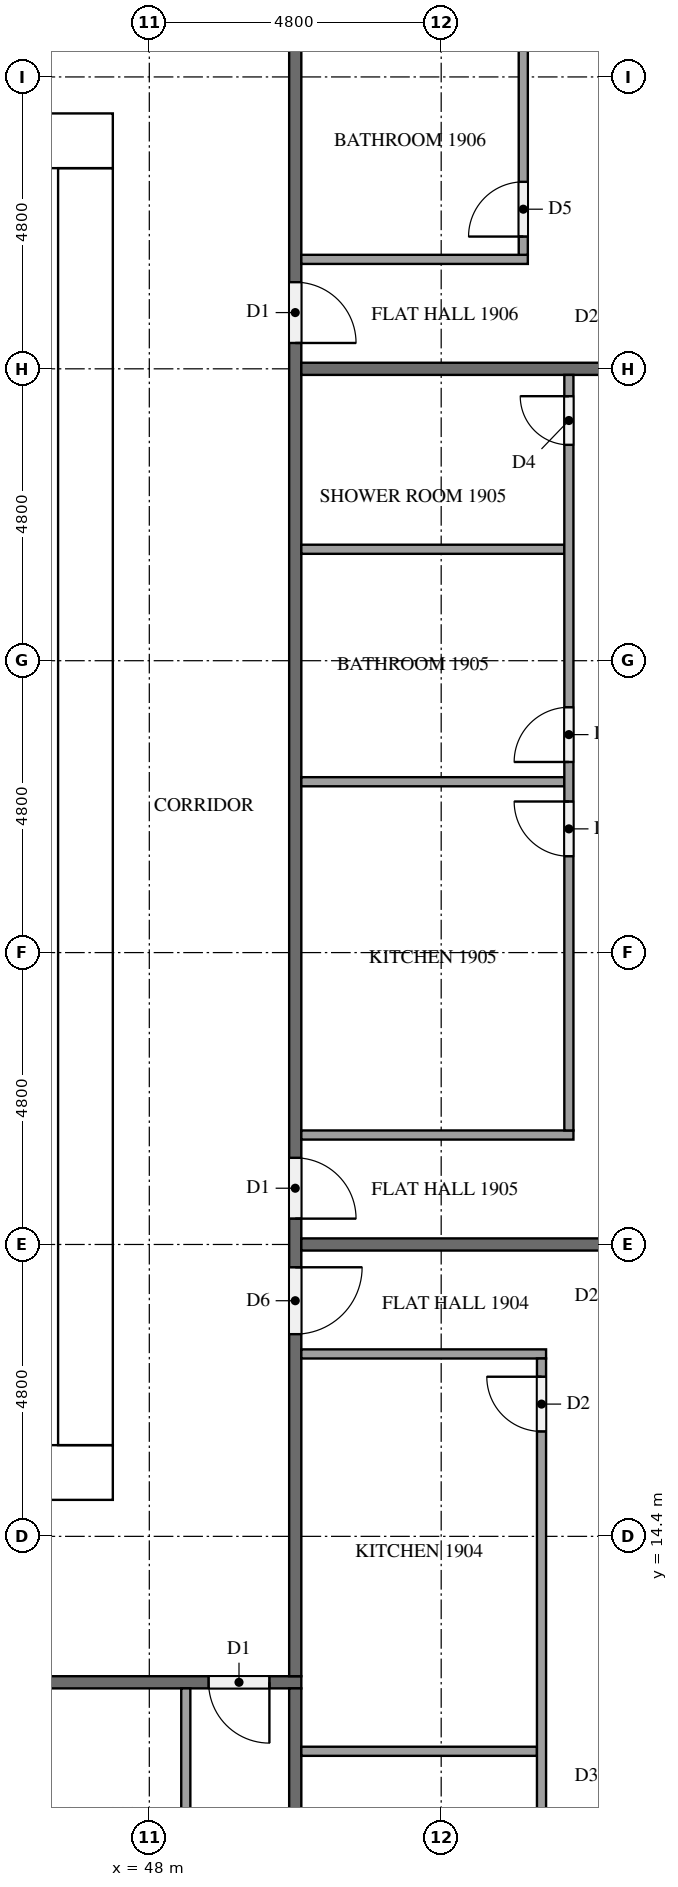
"""IFC4 building model, lengths in metres.
Left out: names, types, materials, properties, quantities, classifications, styles, units other than length and angle.
Written with IfcOpenShell. Run it as: python <this file> out.ifc"""

import sys

from ifc_helpers import new_model, si_unit, direction, frame, frame_2d, origin, place, context, subcontext, project, spatial, rectangle, extrude, element, fill, save


model = new_model("IFC4")
c1 = context("Model", 3, precision=1e-05, world=origin(), true_north=direction((0.0, 1.0)))
c2 = subcontext(c1, "Body", "Model", "MODEL_VIEW")
j1 = project(units=[si_unit("LENGTHUNIT", "METRE"), si_unit("PLANEANGLEUNIT", "RADIAN")], contexts=[c1])
p1 = place(None, origin())
s1 = spatial("IfcSite", under=j1, at=p1, CompositionType="ELEMENT")
p2 = place(p1, origin())
s2 = spatial("IfcBuilding", under=s1, at=p2, CompositionType="ELEMENT")
p3 = place(p2, frame((0.0, 0.0, 76.8)))
s3 = spatial("IfcBuildingStorey", under=s2, at=p3, CompositionType="ELEMENT", Elevation=76.8)
p4 = place(p3, frame((15.0, 15.45, 0.0), z_axis=(0.0, 0.0, 1.0), x_axis=(1.0, 0.0, 0.0)))
e1 = element("IfcWall", 1, at=p4, inside=s3, PredefinedType="SHEAR", context=c2, shape_type="SweptSolid", body=[
    extrude(rectangle(XDim=32.4, YDim=0.9, at=frame_2d((16.2, 0.0))), origin(), (0.0, 0.0, 1.0), 3.2),
])
p5 = place(p4, frame((15.3, 0.0, 0.0)))
e2 = element("IfcOpeningElement", 2, at=p5, cuts=e1, PredefinedType="OPENING", context=c2, shape_type="SweptSolid", body=[
    extrude(rectangle(XDim=1.8, YDim=2.1, at=frame_2d((0.9, 1.05))), frame((0.0, 0.46, 0.0), z_axis=(0.0, -1.0, 0.0), x_axis=(1.0, 0.0, 0.0)), (0.0, 0.0, 1.0), 0.92),
])
p6 = place(p3, frame((15.0, 37.35, 0.0), z_axis=(0.0, 0.0, 1.0), x_axis=(1.0, 0.0, 0.0)))
e3 = element("IfcWall", 3, at=p6, inside=s3, PredefinedType="SHEAR", context=c2, shape_type="SweptSolid", body=[
    extrude(rectangle(XDim=32.4, YDim=0.9, at=frame_2d((16.2, 0.0))), origin(), (0.0, 0.0, 1.0), 3.2),
])
p7 = place(p6, frame((15.3, 0.0, 0.0)))
e4 = element("IfcOpeningElement", 4, at=p7, cuts=e3, PredefinedType="OPENING", context=c2, shape_type="SweptSolid", body=[
    extrude(rectangle(XDim=1.8, YDim=2.1, at=frame_2d((0.9, 1.05))), frame((0.0, 0.46, 0.0), z_axis=(0.0, -1.0, 0.0), x_axis=(1.0, 0.0, 0.0)), (0.0, 0.0, 1.0), 0.92),
])
p8 = place(p6, frame((1.794, 0.0, 0.0)))
e5 = element("IfcOpeningElement", 5, at=p8, cuts=e3, PredefinedType="OPENING", context=c2, shape_type="SweptSolid", body=[
    extrude(rectangle(XDim=1.0, YDim=2.1, at=frame_2d((0.5, 1.05))), frame((0.0, 0.46, 0.0), z_axis=(0.0, -1.0, 0.0), x_axis=(1.0, 0.0, 0.0)), (0.0, 0.0, 1.0), 0.92),
])
p9 = place(p6, frame((5.331, 0.0, 0.0)))
e6 = element("IfcOpeningElement", 6, at=p9, cuts=e3, PredefinedType="OPENING", context=c2, shape_type="SweptSolid", body=[
    extrude(rectangle(XDim=1.0, YDim=2.1, at=frame_2d((0.5, 1.05))), frame((0.0, 0.46, 0.0), z_axis=(0.0, -1.0, 0.0), x_axis=(1.0, 0.0, 0.0)), (0.0, 0.0, 1.0), 0.92),
])
p10 = place(p3, frame((46.95, 15.9, 0.0), z_axis=(0.0, 0.0, 1.0), x_axis=(0.0, 1.0, 0.0)))
e7 = element("IfcWall", 7, at=p10, inside=s3, PredefinedType="SHEAR", context=c2, shape_type="SweptSolid", body=[
    extrude(rectangle(XDim=21.0, YDim=0.9, at=frame_2d((10.5, 0.0))), origin(), (0.0, 0.0, 1.0), 3.2),
])
p11 = place(p10, frame((10.2, 0.0, 0.0)))
e8 = element("IfcOpeningElement", 8, at=p11, cuts=e7, PredefinedType="OPENING", context=c2, shape_type="SweptSolid", body=[
    extrude(rectangle(XDim=1.2, YDim=2.1, at=frame_2d((0.6, 1.05))), frame((0.0, 0.46, 0.0), z_axis=(0.0, -1.0, 0.0), x_axis=(1.0, 0.0, 0.0)), (0.0, 0.0, 1.0), 0.92),
])
p12 = place(p3, frame((50.5, 12.0, 0.0), z_axis=(0.0, 0.0, 1.0), x_axis=(-1.0, 0.0, 0.0)))
e9 = element("IfcWall", 9, at=p12, inside=s3, PredefinedType="PARTITIONING", context=c2, shape_type="SweptSolid", body=[
    extrude(rectangle(XDim=38.6, YDim=0.2, at=frame_2d((19.3, 0.0))), origin(), (0.0, 0.0, 1.0), 3.2),
])
p13 = place(p12, frame((37.075, 0.0, 0.0)))
e10 = element("IfcOpeningElement", 10, at=p13, cuts=e9, PredefinedType="OPENING", context=c2, shape_type="SweptSolid", body=[
    extrude(rectangle(XDim=1.0, YDim=2.1, at=frame_2d((0.5, 1.05))), frame((0.0, 0.11, 0.0), z_axis=(0.0, -1.0, 0.0), x_axis=(1.0, 0.0, 0.0)), (0.0, 0.0, 1.0), 0.22),
])
p14 = place(p12, frame((22.675, 0.0, 0.0)))
e11 = element("IfcOpeningElement", 11, at=p14, cuts=e9, PredefinedType="OPENING", context=c2, shape_type="SweptSolid", body=[
    extrude(rectangle(XDim=1.0, YDim=2.1, at=frame_2d((0.5, 1.05))), frame((0.0, 0.11, 0.0), z_axis=(0.0, -1.0, 0.0), x_axis=(1.0, 0.0, 0.0)), (0.0, 0.0, 1.0), 0.22),
])
p15 = place(p12, frame((0.525, 0.0, 0.0)))
e12 = element("IfcOpeningElement", 12, at=p15, cuts=e9, PredefinedType="OPENING", context=c2, shape_type="SweptSolid", body=[
    extrude(rectangle(XDim=1.0, YDim=2.1, at=frame_2d((0.5, 1.05))), frame((0.0, 0.11, 0.0), z_axis=(0.0, -1.0, 0.0), x_axis=(1.0, 0.0, 0.0)), (0.0, 0.0, 1.0), 0.22),
])
p16 = place(p3, frame((50.4, 40.7, 0.0), z_axis=(0.0, 0.0, 1.0), x_axis=(0.0, -1.0, 0.0)))
e13 = element("IfcWall", 13, at=p16, inside=s3, PredefinedType="PARTITIONING", context=c2, shape_type="SweptSolid", body=[
    extrude(rectangle(XDim=28.6, YDim=0.2, at=frame_2d((14.3, 0.0))), origin(), (0.0, 0.0, 1.0), 3.2),
])
p17 = place(p16, frame((21.875, 0.0, 0.0)))
e14 = element("IfcOpeningElement", 14, at=p17, cuts=e13, PredefinedType="OPENING", context=c2, shape_type="SweptSolid", body=[
    extrude(rectangle(XDim=1.1, YDim=2.1, at=frame_2d((0.55, 1.05))), frame((0.0, 0.11, 0.0), z_axis=(0.0, -1.0, 0.0), x_axis=(1.0, 0.0, 0.0)), (0.0, 0.0, 1.0), 0.22),
])
p18 = place(p16, frame((20.075, 0.0, 0.0)))
e15 = element("IfcOpeningElement", 15, at=p18, cuts=e13, PredefinedType="OPENING", context=c2, shape_type="SweptSolid", body=[
    extrude(rectangle(XDim=1.0, YDim=2.1, at=frame_2d((0.5, 1.05))), frame((0.0, 0.11, 0.0), z_axis=(0.0, -1.0, 0.0), x_axis=(1.0, 0.0, 0.0)), (0.0, 0.0, 1.0), 0.22),
])
p19 = place(p16, frame((5.675, 0.0, 0.0)))
e16 = element("IfcOpeningElement", 16, at=p19, cuts=e13, PredefinedType="OPENING", context=c2, shape_type="SweptSolid", body=[
    extrude(rectangle(XDim=1.0, YDim=2.1, at=frame_2d((0.5, 1.05))), frame((0.0, 0.11, 0.0), z_axis=(0.0, -1.0, 0.0), x_axis=(1.0, 0.0, 0.0)), (0.0, 0.0, 1.0), 0.22),
])
p20 = place(p3, frame((50.4, 11.9, 0.0), z_axis=(0.0, 0.0, 1.0), x_axis=(0.0, -1.0, 0.0)))
e17 = element("IfcWall", 17, at=p20, inside=s3, PredefinedType="PARTITIONING", context=c2, shape_type="SweptSolid", body=[
    extrude(rectangle(XDim=11.8, YDim=0.2, at=frame_2d((5.9, 0.0))), origin(), (0.0, 0.0, 1.0), 3.2),
])
p21 = place(p3, frame((50.5, 19.2, 0.0), z_axis=(0.0, 0.0, 1.0), x_axis=(1.0, 0.0, 0.0)))
e18 = element("IfcWall", 18, at=p21, inside=s3, PredefinedType="PARTITIONING", context=c2, shape_type="SweptSolid", body=[
    extrude(rectangle(XDim=11.8, YDim=0.2, at=frame_2d((5.9, 0.0))), origin(), (0.0, 0.0, 1.0), 3.2),
])
p22 = place(p3, frame((50.5, 33.6, 0.0), z_axis=(0.0, 0.0, 1.0), x_axis=(1.0, 0.0, 0.0)))
e19 = element("IfcWall", 19, at=p22, inside=s3, PredefinedType="PARTITIONING", context=c2, shape_type="SweptSolid", body=[
    extrude(rectangle(XDim=11.475, YDim=0.2, at=frame_2d((5.738, 0.0))), origin(), (0.0, 0.0, 1.0), 3.2),
])
p23 = place(p3, frame((48.6, 11.9, 0.0), z_axis=(0.0, 0.0, 1.0), x_axis=(0.0, -1.0, 0.0)))
e20 = element("IfcWall", 20, at=p23, inside=s3, PredefinedType="PARTITIONING", context=c2, shape_type="SweptSolid", body=[
    extrude(rectangle(XDim=4.325, YDim=0.15, at=frame_2d((2.163, 0.0))), origin(), (0.0, 0.0, 1.0), 3.2),
])
p24 = place(p3, frame((50.5, 10.865, 0.0), z_axis=(0.0, 0.0, 1.0), x_axis=(1.0, 0.0, 0.0)))
e21 = element("IfcWall", 21, at=p24, inside=s3, PredefinedType="PARTITIONING", context=c2, shape_type="SweptSolid", body=[
    extrude(rectangle(XDim=3.875, YDim=0.15, at=frame_2d((1.938, 0.0))), origin(), (0.0, 0.0, 1.0), 3.2),
])
p25 = place(p3, frame((50.5, 17.4, 0.0), z_axis=(0.0, 0.0, 1.0), x_axis=(1.0, 0.0, 0.0)))
e22 = element("IfcWall", 22, at=p25, inside=s3, PredefinedType="PARTITIONING", context=c2, shape_type="SweptSolid", body=[
    extrude(rectangle(XDim=4.025, YDim=0.15, at=frame_2d((2.012, 0.0))), origin(), (0.0, 0.0, 1.0), 3.2),
])
p26 = place(p3, frame((54.45, 0.1, 0.0), z_axis=(0.0, 0.0, 1.0), x_axis=(0.0, 1.0, 0.0)))
e23 = element("IfcWall", 23, at=p26, inside=s3, PredefinedType="PARTITIONING", context=c2, shape_type="SweptSolid", body=[
    extrude(rectangle(XDim=17.225, YDim=0.15, at=frame_2d((8.612, 0.0))), origin(), (0.0, 0.0, 1.0), 3.2),
])
p27 = place(p26, frame((16.025, 0.0, 0.0)))
e24 = element("IfcOpeningElement", 24, at=p27, cuts=e23, PredefinedType="OPENING", context=c2, shape_type="SweptSolid", body=[
    extrude(rectangle(XDim=0.9, YDim=2.1, at=frame_2d((0.45, 1.05))), frame((0.0, 0.085, 0.0), z_axis=(0.0, -1.0, 0.0), x_axis=(1.0, 0.0, 0.0)), (0.0, 0.0, 1.0), 0.17),
])
p28 = place(p26, frame((7.861, 0.0, 0.0)))
e25 = element("IfcOpeningElement", 25, at=p28, cuts=e23, PredefinedType="OPENING", context=c2, shape_type="SweptSolid", body=[
    extrude(rectangle(XDim=0.8, YDim=2.1, at=frame_2d((0.4, 1.05))), frame((0.0, 0.085, 0.0), z_axis=(0.0, -1.0, 0.0), x_axis=(1.0, 0.0, 0.0)), (0.0, 0.0, 1.0), 0.17),
])
p29 = place(p26, frame((6.311, 0.0, 0.0)))
e26 = element("IfcOpeningElement", 26, at=p29, cuts=e23, PredefinedType="OPENING", context=c2, shape_type="SweptSolid", body=[
    extrude(rectangle(XDim=0.9, YDim=2.1, at=frame_2d((0.45, 1.05))), frame((0.0, 0.085, 0.0), z_axis=(0.0, -1.0, 0.0), x_axis=(1.0, 0.0, 0.0)), (0.0, 0.0, 1.0), 0.17),
])
p30 = place(p26, frame((0.35, 0.0, 0.0)))
e27 = element("IfcOpeningElement", 27, at=p30, cuts=e23, PredefinedType="OPENING", context=c2, shape_type="SweptSolid", body=[
    extrude(rectangle(XDim=0.8, YDim=2.1, at=frame_2d((0.4, 1.05))), frame((0.0, 0.085, 0.0), z_axis=(0.0, -1.0, 0.0), x_axis=(1.0, 0.0, 0.0)), (0.0, 0.0, 1.0), 0.17),
])
for number, where, z_axis, x_axis in (
    (28, (50.5, 26.81, 0.0), (0.0, 0.0, 1.0), (1.0, 0.0, 0.0)),
    (29, (50.5, 30.633, 0.0), (0.0, 0.0, 1.0), (1.0, 0.0, 0.0)),
):
    element("IfcWall", number, at=place(p3, frame(where, z_axis=z_axis, x_axis=x_axis)), inside=s3, PredefinedType="PARTITIONING", context=c2, shape_type="SweptSolid", body=[
        extrude(rectangle(XDim=4.325, YDim=0.15, at=frame_2d((2.163, 0.0))), origin(), (0.0, 0.0, 1.0), 3.2),
    ])
p31 = place(p3, frame((50.5, 21.0, 0.0), z_axis=(0.0, 0.0, 1.0), x_axis=(1.0, 0.0, 0.0)))
e30 = element("IfcWall", 30, at=p31, inside=s3, PredefinedType="PARTITIONING", context=c2, shape_type="SweptSolid", body=[
    extrude(rectangle(XDim=4.475, YDim=0.15, at=frame_2d((2.238, 0.0))), origin(), (0.0, 0.0, 1.0), 3.2),
])
p32 = place(p3, frame((54.9, 21.075, 0.0), z_axis=(0.0, 0.0, 1.0), x_axis=(0.0, 1.0, 0.0)))
e31 = element("IfcWall", 31, at=p32, inside=s3, PredefinedType="PARTITIONING", context=c2, shape_type="SweptSolid", body=[
    extrude(rectangle(XDim=12.425, YDim=0.15, at=frame_2d((6.212, 0.0))), origin(), (0.0, 0.0, 1.0), 3.2),
])
p33 = place(p32, frame((4.51, 0.0, 0.0)))
e32 = element("IfcOpeningElement", 32, at=p33, cuts=e31, PredefinedType="OPENING", context=c2, shape_type="SweptSolid", body=[
    extrude(rectangle(XDim=0.9, YDim=2.1, at=frame_2d((0.45, 1.05))), frame((0.0, 0.085, 0.0), z_axis=(0.0, -1.0, 0.0), x_axis=(1.0, 0.0, 0.0)), (0.0, 0.0, 1.0), 0.17),
])
p34 = place(p32, frame((6.06, 0.0, 0.0)))
e33 = element("IfcOpeningElement", 33, at=p34, cuts=e31, PredefinedType="OPENING", context=c2, shape_type="SweptSolid", body=[
    extrude(rectangle(XDim=0.9, YDim=2.1, at=frame_2d((0.45, 1.05))), frame((0.0, 0.085, 0.0), z_axis=(0.0, -1.0, 0.0), x_axis=(1.0, 0.0, 0.0)), (0.0, 0.0, 1.0), 0.17),
])
p35 = place(p32, frame((11.275, 0.0, 0.0)))
e34 = element("IfcOpeningElement", 34, at=p35, cuts=e31, PredefinedType="OPENING", context=c2, shape_type="SweptSolid", body=[
    extrude(rectangle(XDim=0.8, YDim=2.1, at=frame_2d((0.4, 1.05))), frame((0.0, 0.085, 0.0), z_axis=(0.0, -1.0, 0.0), x_axis=(1.0, 0.0, 0.0)), (0.0, 0.0, 1.0), 0.17),
])
p36 = place(p3, frame((50.5, 35.4, 0.0), z_axis=(0.0, 0.0, 1.0), x_axis=(1.0, 0.0, 0.0)))
e35 = element("IfcWall", 35, at=p36, inside=s3, PredefinedType="PARTITIONING", context=c2, shape_type="SweptSolid", body=[
    extrude(rectangle(XDim=3.725, YDim=0.15, at=frame_2d((1.863, 0.0))), origin(), (0.0, 0.0, 1.0), 3.2),
])
p37 = place(p3, frame((54.15, 35.475, 0.0), z_axis=(0.0, 0.0, 1.0), x_axis=(0.0, 1.0, 0.0)))
e36 = element("IfcWall", 36, at=p37, inside=s3, PredefinedType="PARTITIONING", context=c2, shape_type="SweptSolid", body=[
    extrude(rectangle(XDim=12.425, YDim=0.15, at=frame_2d((6.212, 0.0))), origin(), (0.0, 0.0, 1.0), 3.2),
])
p38 = place(p37, frame((0.3, 0.0, 0.0)))
e37 = element("IfcOpeningElement", 37, at=p38, cuts=e36, PredefinedType="OPENING", context=c2, shape_type="SweptSolid", body=[
    extrude(rectangle(XDim=0.9, YDim=2.1, at=frame_2d((0.45, 1.05))), frame((0.0, 0.085, 0.0), z_axis=(0.0, -1.0, 0.0), x_axis=(1.0, 0.0, 0.0)), (0.0, 0.0, 1.0), 0.17),
])
p39 = place(p37, frame((8.333, 0.0, 0.0)))
e38 = element("IfcOpeningElement", 38, at=p39, cuts=e36, PredefinedType="OPENING", context=c2, shape_type="SweptSolid", body=[
    extrude(rectangle(XDim=0.9, YDim=2.1, at=frame_2d((0.45, 1.05))), frame((0.0, 0.085, 0.0), z_axis=(0.0, -1.0, 0.0), x_axis=(1.0, 0.0, 0.0)), (0.0, 0.0, 1.0), 0.17),
])
p40 = place(p37, frame((9.883, 0.0, 0.0)))
e39 = element("IfcOpeningElement", 39, at=p40, cuts=e36, PredefinedType="OPENING", context=c2, shape_type="SweptSolid", body=[
    extrude(rectangle(XDim=0.8, YDim=2.1, at=frame_2d((0.4, 1.05))), frame((0.0, 0.085, 0.0), z_axis=(0.0, -1.0, 0.0), x_axis=(1.0, 0.0, 0.0)), (0.0, 0.0, 1.0), 0.17),
])
p41 = place(p11, origin())
e40 = element("IfcDoor", 40, at=p41, inside=s3, OperationType="SINGLE_SWING_LEFT", PredefinedType="DOOR", context=c2, shape_type="SweptSolid", body=[
    extrude(rectangle(XDim=1.2, YDim=2.1, at=frame_2d((0.6, 1.05))), frame((0.0, 0.025, 0.0), z_axis=(0.0, -1.0, 0.0), x_axis=(1.0, 0.0, 0.0)), (0.0, 0.0, 1.0), 0.05),
])
fill(e8, e40)
p42 = place(p15, origin())
e41 = element("IfcDoor", 41, at=p42, inside=s3, OperationType="SINGLE_SWING_LEFT", PredefinedType="DOOR", context=c2, shape_type="SweptSolid", body=[
    extrude(rectangle(XDim=1.0, YDim=2.1, at=frame_2d((0.5, 1.05))), frame((0.0, 0.025, 0.0), z_axis=(0.0, -1.0, 0.0), x_axis=(1.0, 0.0, 0.0)), (0.0, 0.0, 1.0), 0.05),
])
fill(e12, e41)
p43 = place(p17, origin())
e42 = element("IfcDoor", 42, at=p43, inside=s3, OperationType="SINGLE_SWING_LEFT", PredefinedType="DOOR", context=c2, shape_type="SweptSolid", body=[
    extrude(rectangle(XDim=1.1, YDim=2.1, at=frame_2d((0.55, 1.05))), frame((0.0, 0.025, 0.0), z_axis=(0.0, -1.0, 0.0), x_axis=(1.0, 0.0, 0.0)), (0.0, 0.0, 1.0), 0.05),
])
fill(e14, e42)
p44 = place(p18, origin())
e43 = element("IfcDoor", 43, at=p44, inside=s3, OperationType="SINGLE_SWING_RIGHT", PredefinedType="DOOR", context=c2, shape_type="SweptSolid", body=[
    extrude(rectangle(XDim=1.0, YDim=2.1, at=frame_2d((0.5, 1.05))), frame((0.0, 0.025, 0.0), z_axis=(0.0, -1.0, 0.0), x_axis=(1.0, 0.0, 0.0)), (0.0, 0.0, 1.0), 0.05),
])
fill(e15, e43)
p45 = place(p19, origin())
e44 = element("IfcDoor", 44, at=p45, inside=s3, OperationType="SINGLE_SWING_RIGHT", PredefinedType="DOOR", context=c2, shape_type="SweptSolid", body=[
    extrude(rectangle(XDim=1.0, YDim=2.1, at=frame_2d((0.5, 1.05))), frame((0.0, 0.025, 0.0), z_axis=(0.0, -1.0, 0.0), x_axis=(1.0, 0.0, 0.0)), (0.0, 0.0, 1.0), 0.05),
])
fill(e16, e44)
p46 = place(p27, origin())
e45 = element("IfcDoor", 45, at=p46, inside=s3, OperationType="SINGLE_SWING_RIGHT", PredefinedType="DOOR", context=c2, shape_type="SweptSolid", body=[
    extrude(rectangle(XDim=0.9, YDim=2.1, at=frame_2d((0.45, 1.05))), frame((0.0, 0.025, 0.0), z_axis=(0.0, -1.0, 0.0), x_axis=(1.0, 0.0, 0.0)), (0.0, 0.0, 1.0), 0.05),
])
fill(e24, e45)
p47 = place(p33, origin())
e46 = element("IfcDoor", 46, at=p47, inside=s3, OperationType="SINGLE_SWING_RIGHT", PredefinedType="DOOR", context=c2, shape_type="SweptSolid", body=[
    extrude(rectangle(XDim=0.9, YDim=2.1, at=frame_2d((0.45, 1.05))), frame((0.0, 0.025, 0.0), z_axis=(0.0, -1.0, 0.0), x_axis=(1.0, 0.0, 0.0)), (0.0, 0.0, 1.0), 0.05),
])
fill(e32, e46)
p48 = place(p34, origin())
e47 = element("IfcDoor", 47, at=p48, inside=s3, OperationType="SINGLE_SWING_LEFT", PredefinedType="DOOR", context=c2, shape_type="SweptSolid", body=[
    extrude(rectangle(XDim=0.9, YDim=2.1, at=frame_2d((0.45, 1.05))), frame((0.0, 0.025, 0.0), z_axis=(0.0, -1.0, 0.0), x_axis=(1.0, 0.0, 0.0)), (0.0, 0.0, 1.0), 0.05),
])
fill(e33, e47)
p49 = place(p35, origin())
e48 = element("IfcDoor", 48, at=p49, inside=s3, OperationType="SINGLE_SWING_RIGHT", PredefinedType="DOOR", context=c2, shape_type="SweptSolid", body=[
    extrude(rectangle(XDim=0.8, YDim=2.1, at=frame_2d((0.4, 1.05))), frame((0.0, 0.025, 0.0), z_axis=(0.0, -1.0, 0.0), x_axis=(1.0, 0.0, 0.0)), (0.0, 0.0, 1.0), 0.05),
])
fill(e34, e48)
p50 = place(p38, origin())
e49 = element("IfcDoor", 49, at=p50, inside=s3, OperationType="SINGLE_SWING_LEFT", PredefinedType="DOOR", context=c2, shape_type="SweptSolid", body=[
    extrude(rectangle(XDim=0.9, YDim=2.1, at=frame_2d((0.45, 1.05))), frame((0.0, 0.025, 0.0), z_axis=(0.0, -1.0, 0.0), x_axis=(1.0, 0.0, 0.0)), (0.0, 0.0, 1.0), 0.05),
])
fill(e37, e49)
save(model, sys.argv[1])
